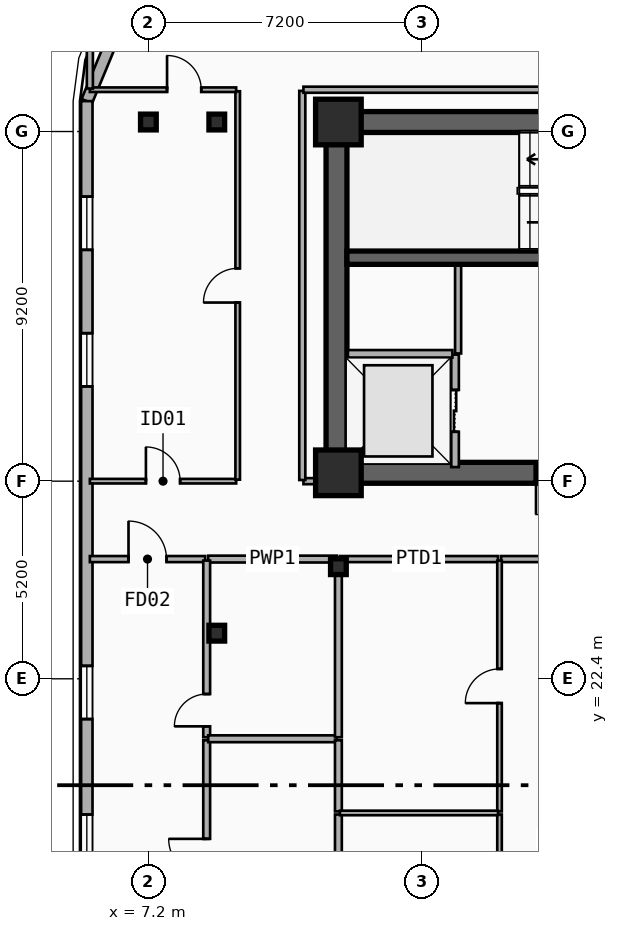
"""IFC4 building model, lengths in metres.
Left out: names, types, materials, properties, quantities, classifications, styles, units other than length and angle.
Written with IfcOpenShell. Run it as: python <this file> out.ifc"""

import sys

from ifc_helpers import new_model, si_unit, direction, frame, frame_2d, origin, origin_2d, place, context, subcontext, project, spatial, rectangle, i_section, extrude, element, fill, save


model = new_model("IFC4")
c1 = context("Model", 3, precision=1e-05, world=origin(), true_north=direction((0.0, 1.0)))
c2 = subcontext(c1, "Body", "Model", "MODEL_VIEW")
j1 = project(units=[si_unit("LENGTHUNIT", "METRE"), si_unit("PLANEANGLEUNIT", "RADIAN")], contexts=[c1])
p1 = place(None, origin())
s1 = spatial("IfcSite", under=j1, at=p1, CompositionType="ELEMENT")
p2 = place(p1, origin())
s2 = spatial("IfcBuilding", under=s1, at=p2, CompositionType="ELEMENT")
p3 = place(p2, frame((0.0, 0.0, 141.25)))
s3 = spatial("IfcBuildingStorey", under=s2, at=p3, CompositionType="ELEMENT", Elevation=141.25)
p4 = place(p3, frame((12.15, 37.05, 0.0), z_axis=(0.0, 0.0, 1.0), x_axis=(1.0, 0.0, 0.0)))
e1 = element("IfcWall", 1, at=p4, inside=s3, PredefinedType="SHEAR", context=c2, shape_type="SweptSolid", body=[
    extrude(rectangle(XDim=33.23, YDim=0.55, at=frame_2d((16.615, 0.0))), origin(), (0.0, 0.0, 1.0), 3.55),
])
p5 = place(p3, frame((21.18, 27.82, 0.0), z_axis=(0.0, 0.0, 1.0), x_axis=(-1.0, 0.0, 0.0)))
e2 = element("IfcWall", 2, at=p5, inside=s3, PredefinedType="SHEAR", context=c2, shape_type="SweptSolid", body=[
    extrude(rectangle(XDim=9.03, YDim=0.55, at=frame_2d((4.515, 0.0))), origin(), (0.0, 0.0, 1.0), 3.55),
])
p6 = place(p5, frame((2.68, 0.0, 0.0)))
e3 = element("IfcOpeningElement", 3, at=p6, cuts=e2, PredefinedType="OPENING", context=c2, shape_type="SweptSolid", body=[
    extrude(rectangle(XDim=1.1, YDim=2.15, at=frame_2d((0.55, 1.075))), frame((0.0, 0.285, 0.0), z_axis=(0.0, -1.0, 0.0), x_axis=(1.0, 0.0, 0.0)), (0.0, 0.0, 1.0), 0.57),
])
p7 = place(p3, frame((12.15, 28.095, 0.0), z_axis=(0.0, 0.0, 1.0), x_axis=(0.0, 1.0, 0.0)))
e4 = element("IfcWall", 4, at=p7, inside=s3, PredefinedType="SHEAR", context=c2, shape_type="SweptSolid", body=[
    extrude(rectangle(XDim=8.68, YDim=0.55, at=frame_2d((4.34, 0.0))), origin(), (0.0, 0.0, 1.0), 3.55),
])
p8 = place(p3, frame((21.005, 33.48, 0.0), z_axis=(0.0, 0.0, 1.0), x_axis=(-1.0, 0.0, 0.0)))
e5 = element("IfcWall", 5, at=p8, inside=s3, PredefinedType="SHEAR", context=c2, shape_type="SweptSolid", body=[
    extrude(rectangle(XDim=8.58, YDim=0.35, at=frame_2d((4.29, 0.0))), origin(), (0.0, 0.0, 1.0), 3.55),
])
p9 = place(p8, frame((0.22, 0.0, 0.0)))
e6 = element("IfcOpeningElement", 6, at=p9, cuts=e5, PredefinedType="OPENING", context=c2, shape_type="SweptSolid", body=[
    extrude(rectangle(XDim=1.1, YDim=2.15, at=frame_2d((0.55, 1.075))), frame((0.0, 0.185, 0.0), z_axis=(0.0, -1.0, 0.0), x_axis=(1.0, 0.0, 0.0)), (0.0, 0.0, 1.0), 0.37),
])
for number, where, z_axis, x_axis in (
    (7, (12.2, 27.82, 0.0), (0.0, 0.0, 1.0), (1.0, 0.0, 0.0)),
    (8, (12.2, 37.05, 0.0), (0.0, 0.0, 1.0), (1.0, 0.0, 0.0)),
):
    element("IfcColumn", number, at=place(p3, frame(where, z_axis=z_axis, x_axis=x_axis)), inside=s3, PredefinedType="COLUMN", context=c2, shape_type="SweptSolid", body=[
        extrude(rectangle(XDim=1.2, YDim=1.2, at=origin_2d()), origin(), (0.0, 0.0, 1.0), 3.55),
    ])
for number, where, z_axis, x_axis in (
    (9, (12.2, 25.35, 0.0), (0.0, 0.0, 1.0), (1.0, 0.0, 0.0)),
    (10, (9.0, 23.6, 0.0), (0.0, 0.0, 1.0), (1.0, 0.0, 0.0)),
    (11, (9.0, 37.05, 0.0), (0.0, 0.0, 1.0), (1.0, 0.0, 0.0)),
    (12, (7.2, 37.05, 0.0), (0.0, 0.0, 1.0), (1.0, 0.0, 0.0)),
):
    element("IfcColumn", number, at=place(p3, frame(where, z_axis=z_axis, x_axis=x_axis)), inside=s3, PredefinedType="COLUMN", context=c2, shape_type="SweptSolid", body=[
        extrude(i_section(OverallWidth=0.413, OverallDepth=0.415, WebThickness=0.03, FlangeThickness=0.047, FilletRadius=0.015, at=origin_2d()), origin(), (0.0, 0.0, 1.0), 3.55),
    ])
p10 = place(p3, frame((5.58, 37.6, 0.0), z_axis=(0.0, 0.0, 1.0), x_axis=(0.382636798336, 0.92389884758, 0.0)))
e13 = element("IfcWall", 13, at=p10, inside=s3, PredefinedType="SOLIDWALL", context=c2, shape_type="SweptSolid", body=[
    extrude(rectangle(XDim=3.077, YDim=0.3, at=frame_2d((1.538, 0.0))), origin(), (0.0, 0.0, 1.0), 3.29),
])
p11 = place(p3, frame((5.58, 14.6, 0.0), z_axis=(0.0, 0.0, 1.0), x_axis=(0.0, 1.0, 0.0)))
e14 = element("IfcWall", 14, at=p11, inside=s3, PredefinedType="SOLIDWALL", context=c2, shape_type="SweptSolid", body=[
    extrude(rectangle(XDim=23.0, YDim=0.3, at=frame_2d((11.5, 0.0))), origin(), (0.0, 0.0, 1.0), 3.29),
])
p12 = place(p11, frame((15.493, 0.0, 0.34)))
e15 = element("IfcOpeningElement", 15, at=p12, cuts=e14, PredefinedType="OPENING", context=c2, shape_type="SweptSolid", body=[
    extrude(rectangle(XDim=1.4, YDim=2.1, at=frame_2d((0.7, 1.05))), frame((0.0, 0.16, 0.0), z_axis=(0.0, -1.0, 0.0), x_axis=(1.0, 0.0, 0.0)), (0.0, 0.0, 1.0), 0.32),
])
p13 = place(p11, frame((19.087, 0.0, 0.34)))
e16 = element("IfcOpeningElement", 16, at=p13, cuts=e14, PredefinedType="OPENING", context=c2, shape_type="SweptSolid", body=[
    extrude(rectangle(XDim=1.4, YDim=2.1, at=frame_2d((0.7, 1.05))), frame((0.0, 0.16, 0.0), z_axis=(0.0, -1.0, 0.0), x_axis=(1.0, 0.0, 0.0)), (0.0, 0.0, 1.0), 0.32),
])
p14 = place(p11, frame((2.83, 0.0, 0.34)))
e17 = element("IfcOpeningElement", 17, at=p14, cuts=e14, PredefinedType="OPENING", context=c2, shape_type="SweptSolid", body=[
    extrude(rectangle(XDim=1.4, YDim=2.1, at=frame_2d((0.7, 1.05))), frame((0.0, 0.16, 0.0), z_axis=(0.0, -1.0, 0.0), x_axis=(1.0, 0.0, 0.0)), (0.0, 0.0, 1.0), 0.32),
])
p15 = place(p11, frame((6.74, 0.0, 0.34)))
e18 = element("IfcOpeningElement", 18, at=p15, cuts=e14, PredefinedType="OPENING", context=c2, shape_type="SweptSolid", body=[
    extrude(rectangle(XDim=1.4, YDim=2.1, at=frame_2d((0.7, 1.05))), frame((0.0, 0.16, 0.0), z_axis=(0.0, -1.0, 0.0), x_axis=(1.0, 0.0, 0.0)), (0.0, 0.0, 1.0), 0.32),
])
p16 = place(p3, frame((15.27, 27.97, 0.0), z_axis=(0.0, 0.0, 1.0), x_axis=(0.0, 1.0, 0.0)))
e19 = element("IfcWall", 19, at=p16, inside=s3, PredefinedType="PARTITIONING", context=c2, shape_type="SweptSolid", body=[
    extrude(rectangle(XDim=2.96, YDim=0.2, at=frame_2d((1.48, 0.0))), origin(), (0.0, 0.0, 1.0), 2.36),
])
p17 = place(p16, frame((0.93, 0.0, 0.0)))
e20 = element("IfcOpeningElement", 20, at=p17, cuts=e19, PredefinedType="OPENING", context=c2, shape_type="SweptSolid", body=[
    extrude(rectangle(XDim=1.1, YDim=2.15, at=frame_2d((0.55, 1.075))), frame((0.0, 0.11, 0.0), z_axis=(0.0, -1.0, 0.0), x_axis=(1.0, 0.0, 0.0)), (0.0, 0.0, 1.0), 0.22),
])
p18 = place(p3, frame((12.45, 30.95, 0.0), z_axis=(0.0, 0.0, 1.0), x_axis=(1.0, 0.0, 0.0)))
e21 = element("IfcWall", 21, at=p18, inside=s3, PredefinedType="PARTITIONING", context=c2, shape_type="SweptSolid", body=[
    extrude(rectangle(XDim=2.75, YDim=0.2, at=frame_2d((1.375, 0.0))), origin(), (0.0, 0.0, 1.0), 2.36),
])
p19 = place(p3, frame((5.66, 27.6, 0.0), z_axis=(0.0, 0.0, 1.0), x_axis=(1.0, 0.0, 0.0)))
e22 = element("IfcWall", 22, at=p19, inside=s3, PredefinedType="PARTITIONING", context=c2, shape_type="SweptSolid", body=[
    extrude(rectangle(XDim=3.85, YDim=0.12, at=frame_2d((1.925, 0.0))), origin(), (0.0, 0.0, 1.0), 2.62),
])
p20 = place(p19, frame((1.475, 0.0, 0.0)))
e23 = element("IfcOpeningElement", 23, at=p20, cuts=e22, PredefinedType="OPENING", context=c2, shape_type="SweptSolid", body=[
    extrude(rectangle(XDim=0.9, YDim=2.1, at=frame_2d((0.45, 1.05))), frame((0.0, 0.07, 0.0), z_axis=(0.0, -1.0, 0.0), x_axis=(1.0, 0.0, 0.0)), (0.0, 0.0, 1.0), 0.14),
])
p21 = place(p3, frame((5.66, 25.55, 0.0), z_axis=(0.0, 0.0, 1.0), x_axis=(1.0, 0.0, 0.0)))
e24 = element("IfcWall", 24, at=p21, inside=s3, PredefinedType="PARTITIONING", context=c2, shape_type="SweptSolid", body=[
    extrude(rectangle(XDim=3.034, YDim=0.16, at=frame_2d((1.517, 0.0))), origin(), (0.0, 0.0, 1.0), 2.62),
])
p22 = place(p21, frame((1.017, 0.0, 0.0)))
e25 = element("IfcOpeningElement", 25, at=p22, cuts=e24, PredefinedType="OPENING", context=c2, shape_type="SweptSolid", body=[
    extrude(rectangle(XDim=1.0, YDim=2.15, at=frame_2d((0.5, 1.075))), frame((0.0, 0.09, 0.0), z_axis=(0.0, -1.0, 0.0), x_axis=(1.0, 0.0, 0.0)), (0.0, 0.0, 1.0), 0.18),
])
p23 = place(p3, frame((8.774, 25.55, 0.0), z_axis=(0.0, 0.0, 1.0), x_axis=(1.0, 0.0, 0.0)))
e26 = element("IfcWall", 26, at=p23, inside=s3, PredefinedType="PLUMBINGWALL", context=c2, shape_type="SweptSolid", body=[
    extrude(rectangle(XDim=3.386, YDim=0.18, at=frame_2d((1.693, 0.0))), origin(), (0.0, 0.0, 1.0), 2.456),
])
p24 = place(p3, frame((16.48, 25.55, 0.0), z_axis=(0.0, 0.0, 1.0), x_axis=(1.0, 0.0, 0.0)))
e27 = element("IfcWall", 27, at=p24, inside=s3, PredefinedType="PARTITIONING", context=c2, shape_type="SweptSolid", body=[
    extrude(rectangle(XDim=3.842, YDim=0.16, at=frame_2d((1.921, 0.0))), origin(), (0.0, 0.0, 1.0), 3.29),
])
p25 = place(p24, frame((1.421, 0.0, 0.0)))
e28 = element("IfcOpeningElement", 28, at=p25, cuts=e27, PredefinedType="OPENING", context=c2, shape_type="SweptSolid", body=[
    extrude(rectangle(XDim=1.0, YDim=2.15, at=frame_2d((0.5, 1.075))), frame((0.0, 0.09, 0.0), z_axis=(0.0, -1.0, 0.0), x_axis=(1.0, 0.0, 0.0)), (0.0, 0.0, 1.0), 0.18),
])
p26 = place(p3, frame((12.24, 25.55, 0.0), z_axis=(0.0, 0.0, 1.0), x_axis=(1.0, 0.0, 0.0)))
e29 = element("IfcWall", 29, at=p26, inside=s3, PredefinedType="PARTITIONING", context=c2, shape_type="SweptSolid", body=[
    extrude(rectangle(XDim=4.16, YDim=0.16, at=frame_2d((2.08, 0.0))), origin(), (0.0, 0.0, 1.0), 2.456),
])
p27 = place(p3, frame((9.55, 27.64, 0.0), z_axis=(0.0, 0.0, 1.0), x_axis=(0.0, 1.0, 0.0)))
e30 = element("IfcWall", 30, at=p27, inside=s3, PredefinedType="PARTITIONING", context=c2, shape_type="SweptSolid", body=[
    extrude(rectangle(XDim=10.22, YDim=0.12, at=frame_2d((5.11, 0.0))), origin(), (0.0, 0.0, 1.0), 2.77),
])
p28 = place(p27, frame((4.66, 0.0, 0.0)))
e31 = element("IfcOpeningElement", 31, at=p28, cuts=e30, PredefinedType="OPENING", context=c2, shape_type="SweptSolid", body=[
    extrude(rectangle(XDim=0.9, YDim=2.1, at=frame_2d((0.45, 1.05))), frame((0.0, 0.07, 0.0), z_axis=(0.0, -1.0, 0.0), x_axis=(1.0, 0.0, 0.0)), (0.0, 0.0, 1.0), 0.14),
])
p29 = place(p3, frame((5.66, 37.9, 0.0), z_axis=(0.0, 0.0, 1.0), x_axis=(1.0, 0.0, 0.0)))
e32 = element("IfcWall", 32, at=p29, inside=s3, PredefinedType="PARTITIONING", context=c2, shape_type="SweptSolid", body=[
    extrude(rectangle(XDim=3.85, YDim=0.12, at=frame_2d((1.925, 0.0))), origin(), (0.0, 0.0, 1.0), 3.29),
])
p30 = place(p29, frame((2.031, 0.0, 0.0)))
e33 = element("IfcOpeningElement", 33, at=p30, cuts=e32, PredefinedType="OPENING", context=c2, shape_type="SweptSolid", body=[
    extrude(rectangle(XDim=0.9, YDim=2.1, at=frame_2d((0.45, 1.05))), frame((0.0, 0.07, 0.0), z_axis=(0.0, -1.0, 0.0), x_axis=(1.0, 0.0, 0.0)), (0.0, 0.0, 1.0), 0.14),
])
p31 = place(p3, frame((8.734, 14.595, 0.0), z_axis=(0.0, 0.0, 1.0), x_axis=(0.0, 1.0, 0.0)))
e34 = element("IfcWall", 34, at=p31, inside=s3, PredefinedType="PLUMBINGWALL", context=c2, shape_type="SweptSolid", body=[
    extrude(rectangle(XDim=6.187, YDim=0.18, at=frame_2d((3.094, 0.0))), origin(), (0.0, 0.0, 1.0), 2.77),
])
p32 = place(p31, frame((2.594, 0.0, 0.0)))
e35 = element("IfcOpeningElement", 35, at=p32, cuts=e34, PredefinedType="OPENING", context=c2, shape_type="SweptSolid", body=[
    extrude(rectangle(XDim=1.0, YDim=2.15, at=frame_2d((0.5, 1.075))), frame((0.0, 0.1, 0.0), z_axis=(0.0, -1.0, 0.0), x_axis=(1.0, 0.0, 0.0)), (0.0, 0.0, 1.0), 0.2),
])
p33 = place(p3, frame((8.734, 20.862, 0.0), z_axis=(0.0, 0.0, 1.0), x_axis=(0.0, 1.0, 0.0)))
e36 = element("IfcWall", 36, at=p33, inside=s3, PredefinedType="PLUMBINGWALL", context=c2, shape_type="SweptSolid", body=[
    extrude(rectangle(XDim=4.648, YDim=0.18, at=frame_2d((2.324, 0.0))), origin(), (0.0, 0.0, 1.0), 2.77),
])
p34 = place(p33, frame((0.287, 0.0, 0.0)))
e37 = element("IfcOpeningElement", 37, at=p34, cuts=e36, PredefinedType="OPENING", context=c2, shape_type="SweptSolid", body=[
    extrude(rectangle(XDim=0.85, YDim=2.1, at=frame_2d((0.425, 1.05))), frame((0.0, 0.1, 0.0), z_axis=(0.0, -1.0, 0.0), x_axis=(1.0, 0.0, 0.0)), (0.0, 0.0, 1.0), 0.2),
])
p35 = place(p3, frame((8.774, 20.822, 0.0), z_axis=(0.0, 0.0, 1.0), x_axis=(1.0, 0.0, 0.0)))
e38 = element("IfcWall", 38, at=p35, inside=s3, PredefinedType="PLUMBINGWALL", context=c2, shape_type="SweptSolid", body=[
    extrude(rectangle(XDim=3.386, YDim=0.18, at=frame_2d((1.693, 0.0))), origin(), (0.0, 0.0, 1.0), 2.456),
])
p36 = place(p3, frame((12.2, 14.595, 0.0), z_axis=(0.0, 0.0, 1.0), x_axis=(0.0, 1.0, 0.0)))
e39 = element("IfcWall", 39, at=p36, inside=s3, PredefinedType="PLUMBINGWALL", context=c2, shape_type="SweptSolid", body=[
    extrude(rectangle(XDim=4.235, YDim=0.18, at=frame_2d((2.118, 0.0))), origin(), (0.0, 0.0, 1.0), 2.456),
])
p37 = place(p3, frame((12.2, 18.91, 0.0), z_axis=(0.0, 0.0, 1.0), x_axis=(0.0, 1.0, 0.0)))
e40 = element("IfcWall", 40, at=p37, inside=s3, PredefinedType="PLUMBINGWALL", context=c2, shape_type="SweptSolid", body=[
    extrude(rectangle(XDim=1.872, YDim=0.18, at=frame_2d((0.936, 0.0))), origin(), (0.0, 0.0, 1.0), 2.456),
])
p38 = place(p3, frame((12.2, 20.862, 0.0), z_axis=(0.0, 0.0, 1.0), x_axis=(0.0, 1.0, 0.0)))
e41 = element("IfcWall", 41, at=p38, inside=s3, PredefinedType="PLUMBINGWALL", context=c2, shape_type="SweptSolid", body=[
    extrude(rectangle(XDim=4.648, YDim=0.18, at=frame_2d((2.324, 0.0))), origin(), (0.0, 0.0, 1.0), 2.456),
])
p39 = place(p3, frame((16.44, 10.66, 0.0), z_axis=(0.0, 0.0, 1.0), x_axis=(0.0, 1.0, 0.0)))
e42 = element("IfcWall", 42, at=p39, inside=s3, PredefinedType="PARTITIONING", context=c2, shape_type="SweptSolid", body=[
    extrude(rectangle(XDim=8.17, YDim=0.12, at=frame_2d((4.085, 0.0))), origin(), (0.0, 0.0, 1.0), 2.88),
])
p40 = place(p39, frame((3.635, 0.0, 0.0)))
e43 = element("IfcOpeningElement", 43, at=p40, cuts=e42, PredefinedType="OPENING", context=c2, shape_type="SweptSolid", body=[
    extrude(rectangle(XDim=0.9, YDim=2.1, at=frame_2d((0.45, 1.05))), frame((0.0, 0.07, 0.0), z_axis=(0.0, -1.0, 0.0), x_axis=(1.0, 0.0, 0.0)), (0.0, 0.0, 1.0), 0.14),
])
p41 = place(p3, frame((16.44, 18.91, 0.0), z_axis=(0.0, 0.0, 1.0), x_axis=(0.0, 1.0, 0.0)))
e44 = element("IfcWall", 44, at=p41, inside=s3, PredefinedType="PARTITIONING", context=c2, shape_type="SweptSolid", body=[
    extrude(rectangle(XDim=6.6, YDim=0.12, at=frame_2d((3.3, 0.0))), origin(), (0.0, 0.0, 1.0), 2.72),
])
p42 = place(p41, frame((2.85, 0.0, 0.0)))
e45 = element("IfcOpeningElement", 45, at=p42, cuts=e44, PredefinedType="OPENING", context=c2, shape_type="SweptSolid", body=[
    extrude(rectangle(XDim=0.9, YDim=2.1, at=frame_2d((0.45, 1.05))), frame((0.0, 0.07, 0.0), z_axis=(0.0, -1.0, 0.0), x_axis=(1.0, 0.0, 0.0)), (0.0, 0.0, 1.0), 0.14),
])
p43 = place(p3, frame((12.24, 18.87, 0.0), z_axis=(0.0, 0.0, 1.0), x_axis=(1.0, 0.0, 0.0)))
e46 = element("IfcWall", 46, at=p43, inside=s3, PredefinedType="PARTITIONING", context=c2, shape_type="SweptSolid", body=[
    extrude(rectangle(XDim=4.16, YDim=0.12, at=frame_2d((2.08, 0.0))), origin(), (0.0, 0.0, 1.0), 2.456),
])
p44 = place(p3, frame((15.35, 30.96, 0.0), z_axis=(0.0, 0.0, 1.0), x_axis=(0.0, 1.0, 0.0)))
e47 = element("IfcWall", 47, at=p44, inside=s3, PredefinedType="PARTITIONING", context=c2, shape_type="SweptSolid", body=[
    extrude(rectangle(XDim=2.31, YDim=0.16, at=frame_2d((1.155, 0.0))), origin(), (0.0, 0.0, 1.0), 3.29),
])
p45 = place(p3, frame((11.28, 27.6, 0.0), z_axis=(0.0, 0.0, 1.0), x_axis=(1.0, 0.0, 0.0)))
e48 = element("IfcWall", 48, at=p45, inside=s3, PredefinedType="PARTITIONING", context=c2, shape_type="SweptSolid", body=[
    extrude(rectangle(XDim=0.84, YDim=0.16, at=frame_2d((0.42, 0.0))), origin(), (0.0, 0.0, 1.0), 2.36),
])
p46 = place(p3, frame((11.25, 27.63, 0.0), z_axis=(0.0, 0.0, 1.0), x_axis=(0.0, 1.0, 0.0)))
e49 = element("IfcWall", 49, at=p46, inside=s3, PredefinedType="PARTITIONING", context=c2, shape_type="SweptSolid", body=[
    extrude(rectangle(XDim=10.24, YDim=0.16, at=frame_2d((5.12, 0.0))), origin(), (0.0, 0.0, 1.0), 2.77),
])
p47 = place(p3, frame((11.28, 37.9, 0.0), z_axis=(0.0, 0.0, 1.0), x_axis=(1.0, 0.0, 0.0)))
e50 = element("IfcWall", 50, at=p47, inside=s3, PredefinedType="PARTITIONING", context=c2, shape_type="SweptSolid", body=[
    extrude(rectangle(XDim=35.04, YDim=0.16, at=frame_2d((17.52, 0.0))), origin(), (0.0, 0.0, 1.0), 3.29),
])
p48 = place(p3, frame((5.66, 37.93, 0.0), z_axis=(0.0, 0.0, 1.0), x_axis=(0.0, 1.0, 0.0)))
e51 = element("IfcWall", 51, at=p48, inside=s3, PredefinedType="PARTITIONING", context=c2, shape_type="SweptSolid", body=[
    extrude(rectangle(XDim=1.44, YDim=0.16, at=frame_2d((0.72, 0.0))), origin(), (0.0, 0.0, 1.0), 3.29),
])
p49 = place(p12, origin())
e52 = element("IfcWindow", 52, at=p49, inside=s3, PartitioningType="SINGLE_PANEL", PredefinedType="WINDOW", context=c2, shape_type="SweptSolid", body=[
    extrude(rectangle(XDim=1.4, YDim=2.1, at=frame_2d((0.7, 1.05))), frame((0.0, 0.03, 0.0), z_axis=(0.0, -1.0, 0.0), x_axis=(1.0, 0.0, 0.0)), (0.0, 0.0, 1.0), 0.06),
])
fill(e15, e52)
p50 = place(p13, origin())
e53 = element("IfcWindow", 53, at=p50, inside=s3, PartitioningType="SINGLE_PANEL", PredefinedType="WINDOW", context=c2, shape_type="SweptSolid", body=[
    extrude(rectangle(XDim=1.4, YDim=2.1, at=frame_2d((0.7, 1.05))), frame((0.0, 0.03, 0.0), z_axis=(0.0, -1.0, 0.0), x_axis=(1.0, 0.0, 0.0)), (0.0, 0.0, 1.0), 0.06),
])
fill(e16, e53)
p51 = place(p14, origin())
e54 = element("IfcWindow", 54, at=p51, inside=s3, PartitioningType="SINGLE_PANEL", PredefinedType="WINDOW", context=c2, shape_type="SweptSolid", body=[
    extrude(rectangle(XDim=1.4, YDim=2.1, at=frame_2d((0.7, 1.05))), frame((0.0, 0.03, 0.0), z_axis=(0.0, -1.0, 0.0), x_axis=(1.0, 0.0, 0.0)), (0.0, 0.0, 1.0), 0.06),
])
fill(e17, e54)
p52 = place(p15, origin())
e55 = element("IfcWindow", 55, at=p52, inside=s3, PartitioningType="SINGLE_PANEL", PredefinedType="WINDOW", context=c2, shape_type="SweptSolid", body=[
    extrude(rectangle(XDim=1.4, YDim=2.1, at=frame_2d((0.7, 1.05))), frame((0.0, 0.03, 0.0), z_axis=(0.0, -1.0, 0.0), x_axis=(1.0, 0.0, 0.0)), (0.0, 0.0, 1.0), 0.06),
])
fill(e18, e55)
p53 = place(p17, origin())
e56 = element("IfcDoor", 56, at=p53, inside=s3, OperationType="DOUBLE_DOOR_SLIDING", PredefinedType="DOOR", context=c2, shape_type="SweptSolid", body=[
    extrude(rectangle(XDim=1.1, YDim=2.15, at=frame_2d((0.55, 1.075))), frame((0.0, 0.025, 0.0), z_axis=(0.0, -1.0, 0.0), x_axis=(1.0, 0.0, 0.0)), (0.0, 0.0, 1.0), 0.05),
])
fill(e20, e56)
p54 = place(p6, origin())
e57 = element("IfcDoor", 57, at=p54, inside=s3, OperationType="SINGLE_SWING_RIGHT", PredefinedType="DOOR", context=c2, shape_type="SweptSolid", body=[
    extrude(rectangle(XDim=1.1, YDim=2.15, at=frame_2d((0.55, 1.075))), frame((0.0, 0.025, 0.0), z_axis=(0.0, -1.0, 0.0), x_axis=(1.0, 0.0, 0.0)), (0.0, 0.0, 1.0), 0.05),
])
fill(e3, e57)
p55 = place(p20, origin())
e58 = element("IfcDoor", 58, at=p55, inside=s3, OperationType="SINGLE_SWING_LEFT", PredefinedType="DOOR", context=c2, shape_type="SweptSolid", body=[
    extrude(rectangle(XDim=0.9, YDim=2.1, at=frame_2d((0.45, 1.05))), frame((0.0, 0.025, 0.0), z_axis=(0.0, -1.0, 0.0), x_axis=(1.0, 0.0, 0.0)), (0.0, 0.0, 1.0), 0.05),
])
fill(e23, e58)
p56 = place(p22, origin())
e59 = element("IfcDoor", 59, at=p56, inside=s3, OperationType="SINGLE_SWING_LEFT", PredefinedType="DOOR", context=c2, shape_type="SweptSolid", body=[
    extrude(rectangle(XDim=1.0, YDim=2.15, at=frame_2d((0.5, 1.075))), frame((0.0, 0.025, 0.0), z_axis=(0.0, -1.0, 0.0), x_axis=(1.0, 0.0, 0.0)), (0.0, 0.0, 1.0), 0.05),
])
fill(e25, e59)
p57 = place(p28, origin())
e60 = element("IfcDoor", 60, at=p57, inside=s3, OperationType="SINGLE_SWING_LEFT", PredefinedType="DOOR", context=c2, shape_type="SweptSolid", body=[
    extrude(rectangle(XDim=0.9, YDim=2.1, at=frame_2d((0.45, 1.05))), frame((0.0, 0.025, 0.0), z_axis=(0.0, -1.0, 0.0), x_axis=(1.0, 0.0, 0.0)), (0.0, 0.0, 1.0), 0.05),
])
fill(e31, e60)
p58 = place(p30, origin())
e61 = element("IfcDoor", 61, at=p58, inside=s3, OperationType="SINGLE_SWING_LEFT", PredefinedType="DOOR", context=c2, shape_type="SweptSolid", body=[
    extrude(rectangle(XDim=0.9, YDim=2.1, at=frame_2d((0.45, 1.05))), frame((0.0, 0.025, 0.0), z_axis=(0.0, -1.0, 0.0), x_axis=(1.0, 0.0, 0.0)), (0.0, 0.0, 1.0), 0.05),
])
fill(e33, e61)
p59 = place(p32, origin())
e62 = element("IfcDoor", 62, at=p59, inside=s3, OperationType="SINGLE_SWING_RIGHT", PredefinedType="DOOR", context=c2, shape_type="SweptSolid", body=[
    extrude(rectangle(XDim=1.0, YDim=2.15, at=frame_2d((0.5, 1.075))), frame((0.0, 0.025, 0.0), z_axis=(0.0, -1.0, 0.0), x_axis=(1.0, 0.0, 0.0)), (0.0, 0.0, 1.0), 0.05),
])
fill(e35, e62)
p60 = place(p34, origin())
e63 = element("IfcDoor", 63, at=p60, inside=s3, OperationType="SINGLE_SWING_LEFT", PredefinedType="DOOR", context=c2, shape_type="SweptSolid", body=[
    extrude(rectangle(XDim=0.85, YDim=2.1, at=frame_2d((0.425, 1.05))), frame((0.0, 0.025, 0.0), z_axis=(0.0, -1.0, 0.0), x_axis=(1.0, 0.0, 0.0)), (0.0, 0.0, 1.0), 0.05),
])
fill(e37, e63)
p61 = place(p42, origin())
e64 = element("IfcDoor", 64, at=p61, inside=s3, OperationType="SINGLE_SWING_LEFT", PredefinedType="DOOR", context=c2, shape_type="SweptSolid", body=[
    extrude(rectangle(XDim=0.9, YDim=2.1, at=frame_2d((0.45, 1.05))), frame((0.0, 0.025, 0.0), z_axis=(0.0, -1.0, 0.0), x_axis=(1.0, 0.0, 0.0)), (0.0, 0.0, 1.0), 0.05),
])
fill(e45, e64)
save(model, sys.argv[1])
